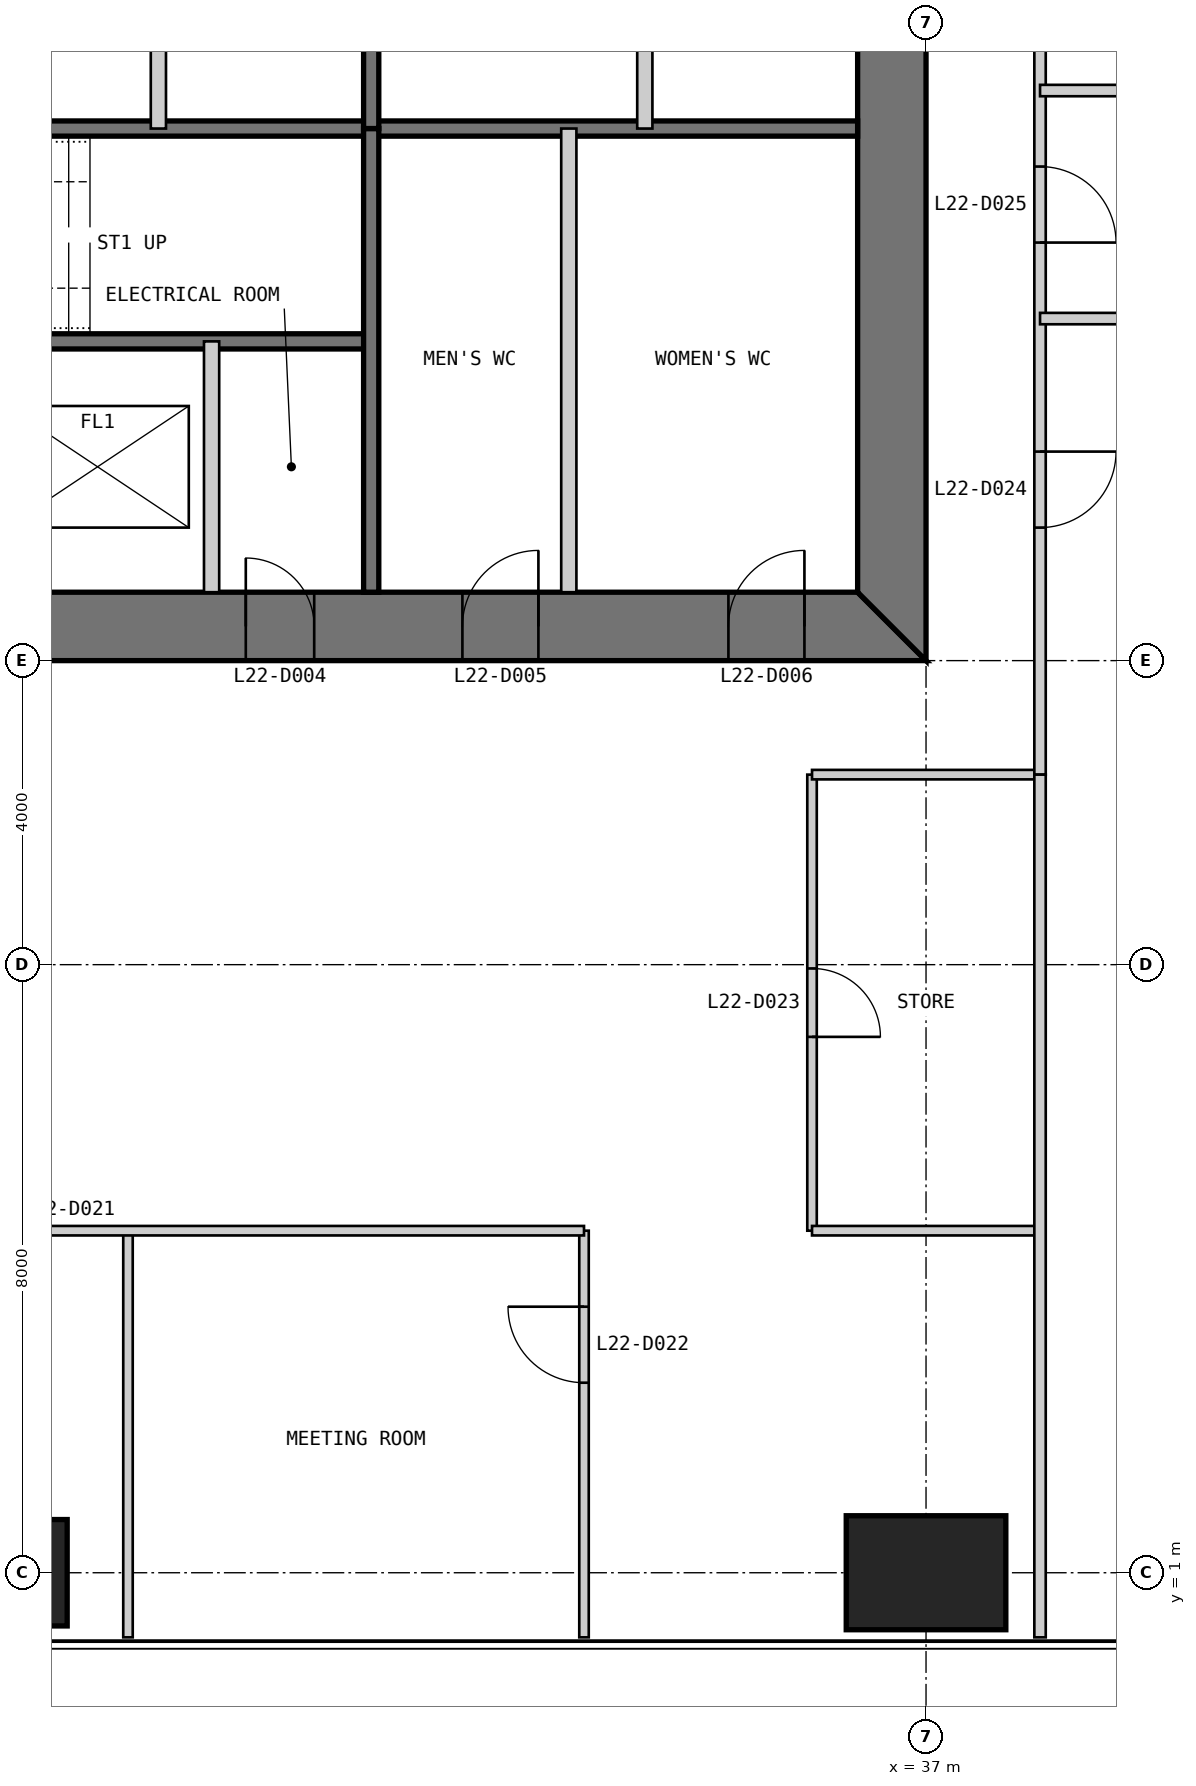
"""IFC4 building model, lengths in metres.
Left out: names, types, materials, properties, quantities, classifications, styles, units other than length and angle.
Written with IfcOpenShell. Run it as: python <this file> out.ifc"""

import sys

from ifc_helpers import new_model, si_unit, direction, frame, frame_2d, origin, origin_2d, place, context, subcontext, project, spatial, polyline, rectangle, outline, extrude, element, fill, save


model = new_model("IFC4")
c1 = context("Model", 3, precision=1e-05, world=origin(), true_north=direction((0.0, 1.0)))
c2 = subcontext(c1, "Body", "Model", "MODEL_VIEW")
j1 = project(units=[si_unit("LENGTHUNIT", "METRE"), si_unit("PLANEANGLEUNIT", "RADIAN")], contexts=[c1])
p1 = place(None, origin())
s1 = spatial("IfcSite", under=j1, at=p1, CompositionType="ELEMENT")
p2 = place(p1, origin())
s2 = spatial("IfcBuilding", under=s1, at=p2, CompositionType="ELEMENT")
p3 = place(p2, frame((0.0, 0.0, 97.0)))
s3 = spatial("IfcBuildingStorey", under=s2, at=p3, CompositionType="ELEMENT", Elevation=97.0)
p4 = place(p3, frame((25.0, 1.0, 0.0), z_axis=(0.0, 0.0, 1.0), x_axis=(1.0, 0.0, 0.0)))
e1 = element("IfcColumn", 1, at=p4, inside=s3, PredefinedType="COLUMN", context=c2, shape_type="SweptSolid", body=[
    extrude(rectangle(XDim=1.4, YDim=1.4, at=origin_2d()), origin(), (0.0, 0.0, 1.0), 5.4),
])
p5 = place(p3, frame((37.0, 1.0, 0.0), z_axis=(0.0, 0.0, 1.0), x_axis=(1.0, 0.0, 0.0)))
e2 = element("IfcColumn", 2, at=p5, inside=s3, PredefinedType="COLUMN", context=c2, shape_type="SweptSolid", body=[
    extrude(rectangle(XDim=2.1, YDim=1.5, at=origin_2d()), origin(), (0.0, 0.0, 1.0), 5.4),
])
p6 = place(p3, frame((13.0, 13.45, 0.0), z_axis=(0.0, 0.0, 1.0), x_axis=(1.0, 0.0, 0.0)))
e3 = element("IfcWall", 3, at=p6, inside=s3, PredefinedType="SHEAR", context=c2, shape_type="SweptSolid", body=[
    extrude(outline(polyline([(0.0, -0.45), (24.0, -0.45), (23.1, 0.45), (0.9, 0.45), (0.0, -0.45)])), origin(), (0.0, 0.0, 1.0), 5.4),
])
p7 = place(p6, frame((4.9, 0.0, 0.0)))
e4 = element("IfcOpeningElement", 4, at=p7, cuts=e3, PredefinedType="OPENING", context=c2, shape_type="SweptSolid", body=[
    extrude(rectangle(XDim=1.0, YDim=2.2, at=frame_2d((0.5, 1.1))), frame((0.0, 0.46, 0.0), z_axis=(0.0, -1.0, 0.0), x_axis=(1.0, 0.0, 0.0)), (0.0, 0.0, 1.0), 0.92),
])
p8 = place(p6, frame((8.9, 0.0, 0.0)))
e5 = element("IfcOpeningElement", 5, at=p8, cuts=e3, PredefinedType="OPENING", context=c2, shape_type="SweptSolid", body=[
    extrude(rectangle(XDim=1.1, YDim=2.2, at=frame_2d((0.55, 1.1))), frame((0.0, 0.46, 0.0), z_axis=(0.0, -1.0, 0.0), x_axis=(1.0, 0.0, 0.0)), (0.0, 0.0, 1.0), 0.92),
])
p9 = place(p6, frame((15.05, 0.0, 0.0)))
e6 = element("IfcOpeningElement", 6, at=p9, cuts=e3, PredefinedType="OPENING", context=c2, shape_type="SweptSolid", body=[
    extrude(rectangle(XDim=0.9, YDim=2.2, at=frame_2d((0.45, 1.1))), frame((0.0, 0.46, 0.0), z_axis=(0.0, -1.0, 0.0), x_axis=(1.0, 0.0, 0.0)), (0.0, 0.0, 1.0), 0.92),
])
p10 = place(p6, frame((17.9, 0.0, 0.0)))
e7 = element("IfcOpeningElement", 7, at=p10, cuts=e3, PredefinedType="OPENING", context=c2, shape_type="SweptSolid", body=[
    extrude(rectangle(XDim=1.0, YDim=2.2, at=frame_2d((0.5, 1.1))), frame((0.0, 0.46, 0.0), z_axis=(0.0, -1.0, 0.0), x_axis=(1.0, 0.0, 0.0)), (0.0, 0.0, 1.0), 0.92),
])
p11 = place(p6, frame((21.4, 0.0, 0.0)))
e8 = element("IfcOpeningElement", 8, at=p11, cuts=e3, PredefinedType="OPENING", context=c2, shape_type="SweptSolid", body=[
    extrude(rectangle(XDim=1.0, YDim=2.2, at=frame_2d((0.5, 1.1))), frame((0.0, 0.46, 0.0), z_axis=(0.0, -1.0, 0.0), x_axis=(1.0, 0.0, 0.0)), (0.0, 0.0, 1.0), 0.92),
])
p12 = place(p3, frame((36.55, 13.9, 0.0), z_axis=(0.0, 0.0, 1.0), x_axis=(0.0, 1.0, 0.0)))
e9 = element("IfcWall", 9, at=p12, inside=s3, PredefinedType="SHEAR", context=c2, shape_type="SweptSolid", body=[
    extrude(outline(polyline([(-0.9, -0.45), (23.1, -0.45), (22.2, 0.45), (0.0, 0.45), (-0.9, -0.45)])), origin(), (0.0, 0.0, 1.0), 5.4),
])
p13 = place(p12, frame((20.2, 0.0, 0.0)))
e10 = element("IfcOpeningElement", 10, at=p13, cuts=e9, PredefinedType="OPENING", context=c2, shape_type="SweptSolid", body=[
    extrude(rectangle(XDim=1.0, YDim=2.2, at=frame_2d((0.5, 1.1))), frame((0.0, 0.46, 0.0), z_axis=(0.0, -1.0, 0.0), x_axis=(1.0, 0.0, 0.0)), (0.0, 0.0, 1.0), 0.92),
])
p14 = place(p12, frame((17.25, 0.0, 0.0)))
e11 = element("IfcOpeningElement", 11, at=p14, cuts=e9, PredefinedType="OPENING", context=c2, shape_type="SweptSolid", body=[
    extrude(rectangle(XDim=0.9, YDim=2.2, at=frame_2d((0.45, 1.1))), frame((0.0, 0.46, 0.0), z_axis=(0.0, -1.0, 0.0), x_axis=(1.0, 0.0, 0.0)), (0.0, 0.0, 1.0), 0.92),
])
p15 = place(p3, frame((20.3, 17.2, 0.0), z_axis=(0.0, 0.0, 1.0), x_axis=(1.0, 0.0, 0.0)))
e12 = element("IfcWall", 12, at=p15, inside=s3, PredefinedType="SOLIDWALL", context=c2, shape_type="SweptSolid", body=[
    extrude(rectangle(XDim=9.4, YDim=0.2, at=frame_2d((4.7, 0.0))), origin(), (0.0, 0.0, 1.0), 5.2),
])
p16 = place(p15, frame((0.25, 0.0, 0.0)))
e13 = element("IfcOpeningElement", 13, at=p16, cuts=e12, PredefinedType="OPENING", context=c2, shape_type="SweptSolid", body=[
    extrude(rectangle(XDim=1.0, YDim=2.2, at=frame_2d((0.5, 1.1))), frame((0.0, 0.11, 0.0), z_axis=(0.0, -1.0, 0.0), x_axis=(1.0, 0.0, 0.0)), (0.0, 0.0, 1.0), 0.22),
])
p17 = place(p3, frame((20.3, 20.0, 0.0), z_axis=(0.0, 0.0, 1.0), x_axis=(1.0, 0.0, 0.0)))
e14 = element("IfcWall", 14, at=p17, inside=s3, PredefinedType="SOLIDWALL", context=c2, shape_type="SweptSolid", body=[
    extrude(rectangle(XDim=15.8, YDim=0.2, at=frame_2d((7.9, 0.0))), origin(), (0.0, 0.0, 1.0), 5.2),
])
p18 = place(p3, frame((27.6, 13.9, 0.0), z_axis=(0.0, 0.0, 1.0), x_axis=(0.0, 1.0, 0.0)))
e15 = element("IfcWall", 15, at=p18, inside=s3, PredefinedType="PARTITIONING", context=c2, shape_type="SweptSolid", body=[
    extrude(rectangle(XDim=3.3, YDim=0.2, at=frame_2d((1.65, 0.0))), origin(), (0.0, 0.0, 1.0), 5.2),
])
p19 = place(p3, frame((29.7, 13.9, 0.0), z_axis=(0.0, 0.0, 1.0), x_axis=(0.0, 1.0, 0.0)))
e16 = element("IfcWall", 16, at=p19, inside=s3, PredefinedType="SOLIDWALL", context=c2, shape_type="SweptSolid", body=[
    extrude(rectangle(XDim=6.1, YDim=0.2, at=frame_2d((3.05, 0.0))), origin(), (0.0, 0.0, 1.0), 5.2),
])
p20 = place(p3, frame((32.3, 13.9, 0.0), z_axis=(0.0, 0.0, 1.0), x_axis=(0.0, 1.0, 0.0)))
e17 = element("IfcWall", 17, at=p20, inside=s3, PredefinedType="PARTITIONING", context=c2, shape_type="SweptSolid", body=[
    extrude(rectangle(XDim=6.1, YDim=0.2, at=frame_2d((3.05, 0.0))), origin(), (0.0, 0.0, 1.0), 5.2),
])
p21 = place(p3, frame((33.3, 36.1, 0.0), z_axis=(0.0, 0.0, 1.0), x_axis=(0.0, -1.0, 0.0)))
e18 = element("IfcWall", 18, at=p21, inside=s3, PredefinedType="PARTITIONING", context=c2, shape_type="SweptSolid", body=[
    extrude(rectangle(XDim=16.1, YDim=0.2, at=frame_2d((8.05, 0.0))), origin(), (0.0, 0.0, 1.0), 5.2),
])
p22 = place(p21, frame((4.1, 0.0, 0.0)))
e19 = element("IfcOpeningElement", 19, at=p22, cuts=e18, PredefinedType="OPENING", context=c2, shape_type="SweptSolid", body=[
    extrude(rectangle(XDim=0.9, YDim=2.2, at=frame_2d((0.45, 1.1))), frame((0.0, 0.11, 0.0), z_axis=(0.0, -1.0, 0.0), x_axis=(1.0, 0.0, 0.0)), (0.0, 0.0, 1.0), 0.22),
])
p23 = place(p3, frame((29.7, 36.1, 0.0), z_axis=(0.0, 0.0, 1.0), x_axis=(0.0, -1.0, 0.0)))
e20 = element("IfcWall", 20, at=p23, inside=s3, PredefinedType="SOLIDWALL", context=c2, shape_type="SweptSolid", body=[
    extrude(rectangle(XDim=16.1, YDim=0.2, at=frame_2d((8.05, 0.0))), origin(), (0.0, 0.0, 1.0), 5.2),
])
p24 = place(p3, frame((26.9, 30.0, 0.0), z_axis=(0.0, 0.0, 1.0), x_axis=(0.0, -1.0, 0.0)))
e21 = element("IfcWall", 21, at=p24, inside=s3, PredefinedType="PARTITIONING", context=c2, shape_type="SweptSolid", body=[
    extrude(rectangle(XDim=10.0, YDim=0.2, at=frame_2d((5.0, 0.0))), origin(), (0.0, 0.0, 1.0), 5.2),
])
p25 = place(p3, frame((26.5, 0.15, 0.0), z_axis=(0.0, 0.0, 1.0), x_axis=(0.0, 1.0, 0.0)))
e22 = element("IfcWall", 22, at=p25, inside=s3, PredefinedType="PARTITIONING", context=c2, shape_type="SweptSolid", body=[
    extrude(rectangle(XDim=5.35, YDim=0.125, at=frame_2d((2.675, 0.0))), origin(), (0.0, 0.0, 1.0), 5.25),
])
p26 = place(p3, frame((32.5, 0.15, 0.0), z_axis=(0.0, 0.0, 1.0), x_axis=(0.0, 1.0, 0.0)))
e23 = element("IfcWall", 23, at=p26, inside=s3, PredefinedType="PARTITIONING", context=c2, shape_type="SweptSolid", body=[
    extrude(rectangle(XDim=5.35, YDim=0.125, at=frame_2d((2.675, 0.0))), origin(), (0.0, 0.0, 1.0), 5.25),
])
p27 = place(p26, frame((3.35, 0.0, 0.0)))
e24 = element("IfcOpeningElement", 24, at=p27, cuts=e23, PredefinedType="OPENING", context=c2, shape_type="SweptSolid", body=[
    extrude(rectangle(XDim=1.0, YDim=2.2, at=frame_2d((0.5, 1.1))), frame((0.0, 0.073, 0.0), z_axis=(0.0, -1.0, 0.0), x_axis=(1.0, 0.0, 0.0)), (0.0, 0.0, 1.0), 0.145),
])
p28 = place(p3, frame((35.5, 5.5, 0.0), z_axis=(0.0, 0.0, 1.0), x_axis=(0.0, 1.0, 0.0)))
e25 = element("IfcWall", 25, at=p28, inside=s3, PredefinedType="PARTITIONING", context=c2, shape_type="SweptSolid", body=[
    extrude(rectangle(XDim=6.0, YDim=0.125, at=frame_2d((3.0, 0.0))), origin(), (0.0, 0.0, 1.0), 5.25),
])
p29 = place(p28, frame((2.55, 0.0, 0.0)))
e26 = element("IfcOpeningElement", 26, at=p29, cuts=e25, PredefinedType="OPENING", context=c2, shape_type="SweptSolid", body=[
    extrude(rectangle(XDim=0.9, YDim=2.2, at=frame_2d((0.45, 1.1))), frame((0.0, 0.073, 0.0), z_axis=(0.0, -1.0, 0.0), x_axis=(1.0, 0.0, 0.0)), (0.0, 0.0, 1.0), 0.145),
])
p30 = place(p3, frame((14.5, 5.5, 0.0), z_axis=(0.0, 0.0, 1.0), x_axis=(1.0, 0.0, 0.0)))
e27 = element("IfcWall", 27, at=p30, inside=s3, PredefinedType="PARTITIONING", context=c2, shape_type="SweptSolid", body=[
    extrude(rectangle(XDim=18.0, YDim=0.125, at=frame_2d((9.0, 0.0))), origin(), (0.0, 0.0, 1.0), 5.25),
])
p31 = place(p30, frame((10.05, 0.0, 0.0)))
e28 = element("IfcOpeningElement", 28, at=p31, cuts=e27, PredefinedType="OPENING", context=c2, shape_type="SweptSolid", body=[
    extrude(rectangle(XDim=0.9, YDim=2.2, at=frame_2d((0.45, 1.1))), frame((0.0, 0.073, 0.0), z_axis=(0.0, -1.0, 0.0), x_axis=(1.0, 0.0, 0.0)), (0.0, 0.0, 1.0), 0.145),
])
for number, where, z_axis, x_axis in (
    (29, (35.5, 5.5, 0.0), (0.0, 0.0, 1.0), (1.0, 0.0, 0.0)),
    (30, (35.5, 11.5, 0.0), (0.0, 0.0, 1.0), (1.0, 0.0, 0.0)),
):
    element("IfcWall", number, at=place(p3, frame(where, z_axis=z_axis, x_axis=x_axis)), inside=s3, PredefinedType="PARTITIONING", context=c2, shape_type="SweptSolid", body=[
        extrude(rectangle(XDim=3.0, YDim=0.125, at=frame_2d((1.5, 0.0))), origin(), (0.0, 0.0, 1.0), 5.25),
    ])
p32 = place(p3, frame((38.5, 11.5, 0.0), z_axis=(0.0, 0.0, 1.0), x_axis=(0.0, 1.0, 0.0)))
e31 = element("IfcWall", 31, at=p32, inside=s3, PredefinedType="PARTITIONING", context=c2, shape_type="SweptSolid", body=[
    extrude(rectangle(XDim=27.0, YDim=0.15, at=frame_2d((13.5, 0.0))), origin(), (0.0, 0.0, 1.0), 5.25),
])
p33 = place(p32, frame((3.25, 0.0, 0.0)))
e32 = element("IfcOpeningElement", 32, at=p33, cuts=e31, PredefinedType="OPENING", context=c2, shape_type="SweptSolid", body=[
    extrude(rectangle(XDim=1.0, YDim=2.2, at=frame_2d((0.5, 1.1))), frame((0.0, 0.085, 0.0), z_axis=(0.0, -1.0, 0.0), x_axis=(1.0, 0.0, 0.0)), (0.0, 0.0, 1.0), 0.17),
])
p34 = place(p32, frame((7.0, 0.0, 0.0)))
e33 = element("IfcOpeningElement", 33, at=p34, cuts=e31, PredefinedType="OPENING", context=c2, shape_type="SweptSolid", body=[
    extrude(rectangle(XDim=1.0, YDim=2.2, at=frame_2d((0.5, 1.1))), frame((0.0, 0.085, 0.0), z_axis=(0.0, -1.0, 0.0), x_axis=(1.0, 0.0, 0.0)), (0.0, 0.0, 1.0), 0.17),
])
p35 = place(p32, frame((14.5, 0.0, 0.0)))
e34 = element("IfcOpeningElement", 34, at=p35, cuts=e31, PredefinedType="OPENING", context=c2, shape_type="SweptSolid", body=[
    extrude(rectangle(XDim=1.0, YDim=2.2, at=frame_2d((0.5, 1.1))), frame((0.0, 0.085, 0.0), z_axis=(0.0, -1.0, 0.0), x_axis=(1.0, 0.0, 0.0)), (0.0, 0.0, 1.0), 0.17),
])
p36 = place(p3, frame((38.5, 0.15, 0.0), z_axis=(0.0, 0.0, 1.0), x_axis=(0.0, 1.0, 0.0)))
e35 = element("IfcWall", 35, at=p36, inside=s3, PredefinedType="PARTITIONING", context=c2, shape_type="SweptSolid", body=[
    extrude(rectangle(XDim=11.35, YDim=0.15, at=frame_2d((5.675, 0.0))), origin(), (0.0, 0.0, 1.0), 5.25),
])
p37 = place(p3, frame((44.5, 17.5, 0.0), z_axis=(0.0, 0.0, 1.0), x_axis=(-1.0, 0.0, 0.0)))
e36 = element("IfcWall", 36, at=p37, inside=s3, PredefinedType="PARTITIONING", context=c2, shape_type="SweptSolid", body=[
    extrude(rectangle(XDim=6.0, YDim=0.15, at=frame_2d((3.0, 0.0))), origin(), (0.0, 0.0, 1.0), 5.25),
])
p38 = place(p3, frame((49.85, 20.5, 0.0), z_axis=(0.0, 0.0, 1.0), x_axis=(-1.0, 0.0, 0.0)))
e37 = element("IfcWall", 37, at=p38, inside=s3, PredefinedType="PARTITIONING", context=c2, shape_type="SweptSolid", body=[
    extrude(rectangle(XDim=11.35, YDim=0.15, at=frame_2d((5.675, 0.0))), origin(), (0.0, 0.0, 1.0), 5.25),
])
p39 = place(p9, origin())
e38 = element("IfcDoor", 38, at=p39, inside=s3, OperationType="SINGLE_SWING_LEFT", PredefinedType="DOOR", context=c2, shape_type="SweptSolid", body=[
    extrude(rectangle(XDim=0.9, YDim=2.2, at=frame_2d((0.45, 1.1))), frame((0.0, 0.025, 0.0), z_axis=(0.0, -1.0, 0.0), x_axis=(1.0, 0.0, 0.0)), (0.0, 0.0, 1.0), 0.05),
    extrude(outline(polyline([(0.0, 0.0), (0.04, 0.0), (0.04, 2.16), (0.86, 2.16), (0.86, 0.0), (0.9, 0.0), (0.9, 2.2), (0.0, 2.2), (0.0, 0.0)])), frame((0.0, 0.3, 0.0), z_axis=(0.0, -1.0, 0.0), x_axis=(1.0, 0.0, 0.0)), (0.0, 0.0, 1.0), 0.6),
])
fill(e6, e38)
p40 = place(p10, origin())
e39 = element("IfcDoor", 39, at=p40, inside=s3, OperationType="SINGLE_SWING_RIGHT", PredefinedType="DOOR", context=c2, shape_type="SweptSolid", body=[
    extrude(rectangle(XDim=1.0, YDim=2.2, at=frame_2d((0.5, 1.1))), frame((0.0, 0.025, 0.0), z_axis=(0.0, -1.0, 0.0), x_axis=(1.0, 0.0, 0.0)), (0.0, 0.0, 1.0), 0.05),
    extrude(outline(polyline([(0.0, 0.0), (0.04, 0.0), (0.04, 2.16), (0.96, 2.16), (0.96, 0.0), (1.0, 0.0), (1.0, 2.2), (0.0, 2.2), (0.0, 0.0)])), frame((0.0, 0.3, 0.0), z_axis=(0.0, -1.0, 0.0), x_axis=(1.0, 0.0, 0.0)), (0.0, 0.0, 1.0), 0.6),
])
fill(e7, e39)
p41 = place(p11, origin())
e40 = element("IfcDoor", 40, at=p41, inside=s3, OperationType="SINGLE_SWING_RIGHT", PredefinedType="DOOR", context=c2, shape_type="SweptSolid", body=[
    extrude(rectangle(XDim=1.0, YDim=2.2, at=frame_2d((0.5, 1.1))), frame((0.0, 0.025, 0.0), z_axis=(0.0, -1.0, 0.0), x_axis=(1.0, 0.0, 0.0)), (0.0, 0.0, 1.0), 0.05),
    extrude(outline(polyline([(0.0, 0.0), (0.04, 0.0), (0.04, 2.16), (0.96, 2.16), (0.96, 0.0), (1.0, 0.0), (1.0, 2.2), (0.0, 2.2), (0.0, 0.0)])), frame((0.0, 0.3, 0.0), z_axis=(0.0, -1.0, 0.0), x_axis=(1.0, 0.0, 0.0)), (0.0, 0.0, 1.0), 0.6),
])
fill(e8, e40)
p42 = place(p27, origin())
e41 = element("IfcDoor", 41, at=p42, inside=s3, OperationType="SINGLE_SWING_RIGHT", PredefinedType="DOOR", context=c2, shape_type="SweptSolid", body=[
    extrude(rectangle(XDim=1.0, YDim=2.2, at=frame_2d((0.5, 1.1))), frame((0.0, 0.025, 0.0), z_axis=(0.0, -1.0, 0.0), x_axis=(1.0, 0.0, 0.0)), (0.0, 0.0, 1.0), 0.05),
])
fill(e24, e41)
p43 = place(p29, frame((0.9, 0.0, 0.0), z_axis=(0.0, 0.0, 1.0), x_axis=(-1.0, 0.0, 0.0)))
e42 = element("IfcDoor", 42, at=p43, inside=s3, OperationType="SINGLE_SWING_RIGHT", PredefinedType="DOOR", context=c2, shape_type="SweptSolid", body=[
    extrude(rectangle(XDim=0.9, YDim=2.2, at=frame_2d((0.45, 1.1))), frame((0.0, 0.025, 0.0), z_axis=(0.0, -1.0, 0.0), x_axis=(1.0, 0.0, 0.0)), (0.0, 0.0, 1.0), 0.05),
])
fill(e26, e42)
p44 = place(p33, frame((1.0, 0.0, 0.0), z_axis=(0.0, 0.0, 1.0), x_axis=(-1.0, 0.0, 0.0)))
e43 = element("IfcDoor", 43, at=p44, inside=s3, OperationType="SINGLE_SWING_LEFT", PredefinedType="DOOR", context=c2, shape_type="SweptSolid", body=[
    extrude(rectangle(XDim=1.0, YDim=2.2, at=frame_2d((0.5, 1.1))), frame((0.0, 0.025, 0.0), z_axis=(0.0, -1.0, 0.0), x_axis=(1.0, 0.0, 0.0)), (0.0, 0.0, 1.0), 0.05),
])
fill(e32, e43)
p45 = place(p34, frame((1.0, 0.0, 0.0), z_axis=(0.0, 0.0, 1.0), x_axis=(-1.0, 0.0, 0.0)))
e44 = element("IfcDoor", 44, at=p45, inside=s3, OperationType="SINGLE_SWING_RIGHT", PredefinedType="DOOR", context=c2, shape_type="SweptSolid", body=[
    extrude(rectangle(XDim=1.0, YDim=2.2, at=frame_2d((0.5, 1.1))), frame((0.0, 0.025, 0.0), z_axis=(0.0, -1.0, 0.0), x_axis=(1.0, 0.0, 0.0)), (0.0, 0.0, 1.0), 0.05),
])
fill(e33, e44)
save(model, sys.argv[1])
